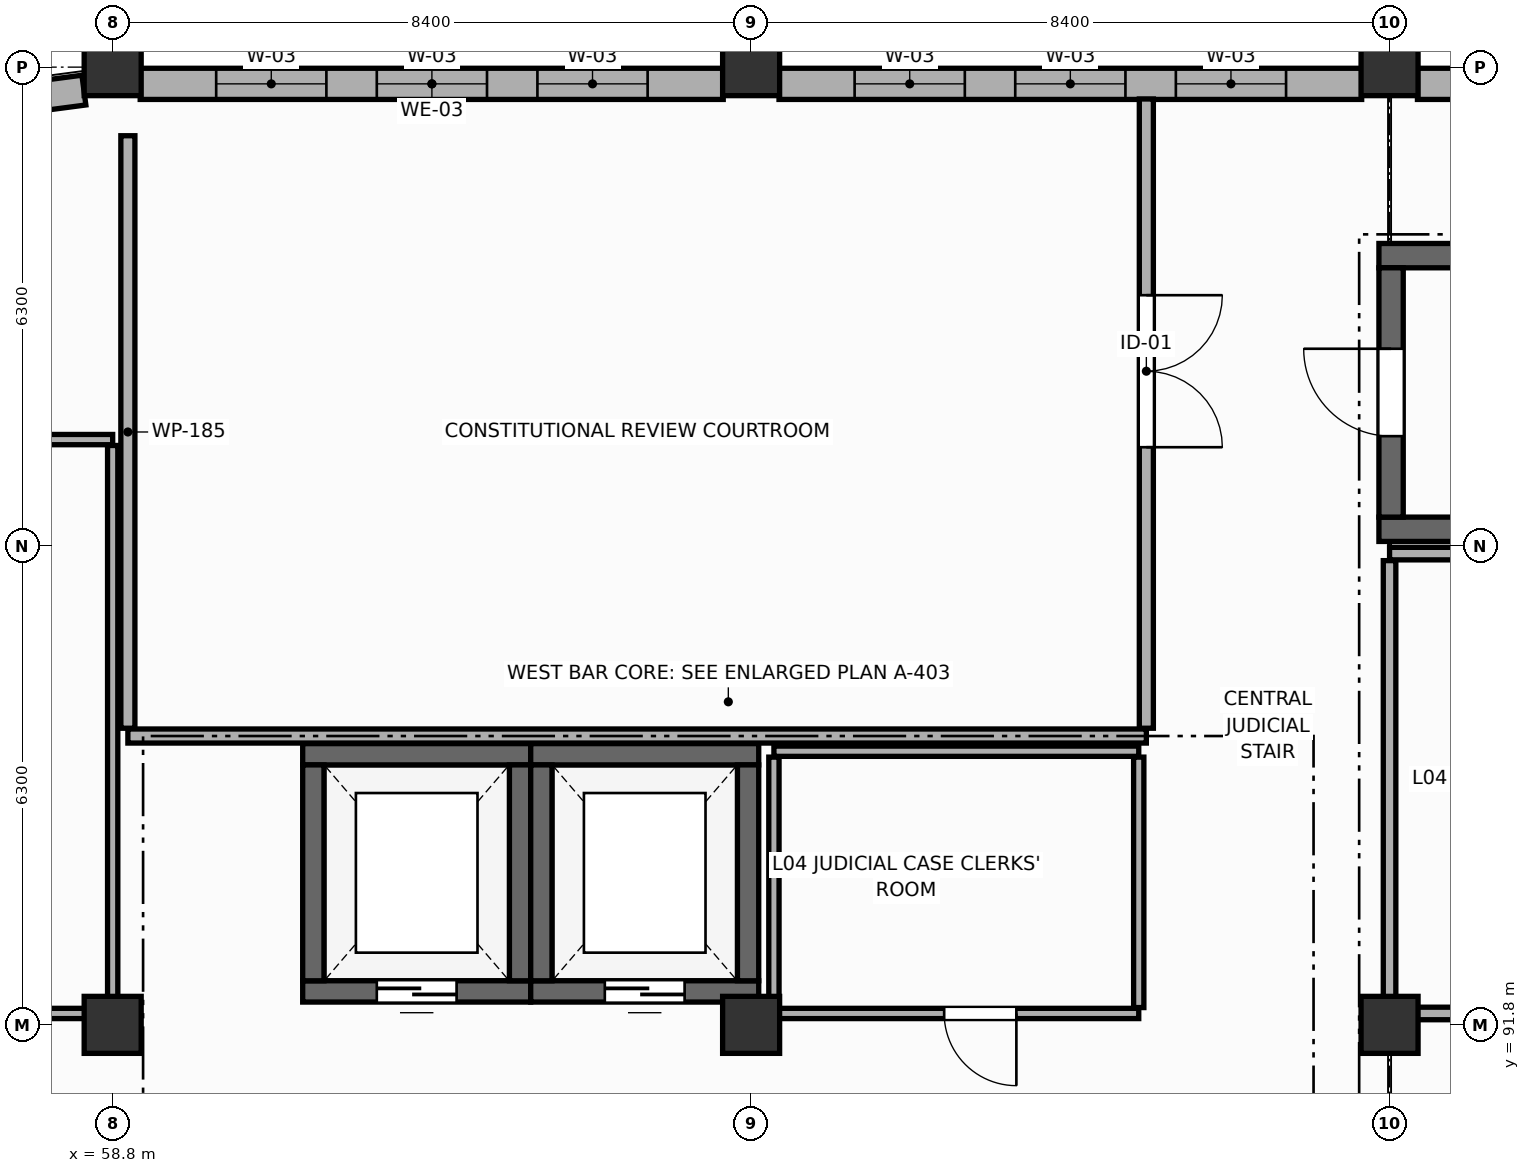
"""IFC4 building model, lengths in metres.
Left out: names, types, materials, properties, quantities, classifications, styles, units other than length and angle.
Written with IfcOpenShell. Run it as: python <this file> out.ifc"""

import sys

from ifc_helpers import new_model, si_unit, direction, frame, frame_2d, origin, origin_2d, place, context, subcontext, project, spatial, rectangle, extrude, element, fill, save


model = new_model("IFC4")
c1 = context("Model", 3, precision=1e-05, world=origin(), true_north=direction((0.0, 1.0)))
c2 = subcontext(c1, "Body", "Model", "MODEL_VIEW")
j1 = project(units=[si_unit("LENGTHUNIT", "METRE"), si_unit("PLANEANGLEUNIT", "RADIAN")], contexts=[c1])
p1 = place(None, origin())
s1 = spatial("IfcSite", under=j1, at=p1, CompositionType="ELEMENT")
p2 = place(p1, origin())
s2 = spatial("IfcBuilding", under=s1, at=p2, CompositionType="ELEMENT")
p3 = place(p2, frame((0.0, 0.0, 14.4)))
s3 = spatial("IfcBuildingStorey", under=s2, at=p3, CompositionType="ELEMENT", Elevation=14.4)
for number, where, z_axis, x_axis in (
    (1, (58.8, 91.8, 0.0), (0.0, 0.0, 1.0), (1.0, 0.0, 0.0)),
    (2, (58.8, 104.4, 0.0), (0.0, 0.0, 1.0), (1.0, 0.0, 0.0)),
    (3, (67.2, 91.8, 0.0), (0.0, 0.0, 1.0), (1.0, 0.0, 0.0)),
    (4, (67.2, 104.4, 0.0), (0.0, 0.0, 1.0), (1.0, 0.0, 0.0)),
    (5, (75.6, 91.8, 0.0), (0.0, 0.0, 1.0), (1.0, 0.0, 0.0)),
    (6, (75.6, 104.4, 0.0), (0.0, 0.0, 1.0), (1.0, 0.0, 0.0)),
):
    element("IfcColumn", number, at=place(p3, frame(where, z_axis=z_axis, x_axis=x_axis)), inside=s3, PredefinedType="COLUMN", context=c2, shape_type="SweptSolid", body=[
        extrude(rectangle(XDim=0.75, YDim=0.75, at=origin_2d()), origin(), (0.0, 0.0, 1.0), 4.2),
    ])
p4 = place(p3, frame((59.162, 104.18, 0.0), z_axis=(0.0, 0.0, 1.0), x_axis=(1.0, 0.0, 0.0)))
e7 = element("IfcWall", 7, at=p4, inside=s3, PredefinedType="STANDARD", context=c2, shape_type="SweptSolid", body=[
    extrude(rectangle(XDim=7.671, YDim=0.41, at=frame_2d((3.835, 0.0))), origin(), (0.0, 0.0, 1.0), 3.09),
])
p5 = place(p4, frame((1.0, 0.0, 0.85)))
e8 = element("IfcOpeningElement", 8, at=p5, cuts=e7, PredefinedType="OPENING", context=c2, shape_type="SweptSolid", body=[
    extrude(rectangle(XDim=1.45, YDim=2.05, at=frame_2d((0.725, 1.025))), frame((0.0, 0.215, 0.0), z_axis=(0.0, -1.0, 0.0), x_axis=(1.0, 0.0, 0.0)), (0.0, 0.0, 1.0), 0.43),
])
p6 = place(p4, frame((3.113, 0.0, 0.85)))
e9 = element("IfcOpeningElement", 9, at=p6, cuts=e7, PredefinedType="OPENING", context=c2, shape_type="SweptSolid", body=[
    extrude(rectangle(XDim=1.45, YDim=2.05, at=frame_2d((0.725, 1.025))), frame((0.0, 0.215, 0.0), z_axis=(0.0, -1.0, 0.0), x_axis=(1.0, 0.0, 0.0)), (0.0, 0.0, 1.0), 0.43),
])
p7 = place(p4, frame((5.226, 0.0, 0.85)))
e10 = element("IfcOpeningElement", 10, at=p7, cuts=e7, PredefinedType="OPENING", context=c2, shape_type="SweptSolid", body=[
    extrude(rectangle(XDim=1.45, YDim=2.05, at=frame_2d((0.725, 1.025))), frame((0.0, 0.215, 0.0), z_axis=(0.0, -1.0, 0.0), x_axis=(1.0, 0.0, 0.0)), (0.0, 0.0, 1.0), 0.43),
])
p8 = place(p3, frame((67.567, 104.18, 0.0), z_axis=(0.0, 0.0, 1.0), x_axis=(1.0, 0.0, 0.0)))
e11 = element("IfcWall", 11, at=p8, inside=s3, PredefinedType="STANDARD", context=c2, shape_type="SweptSolid", body=[
    extrude(rectangle(XDim=7.666, YDim=0.41, at=frame_2d((3.833, 0.0))), origin(), (0.0, 0.0, 1.0), 3.09),
])
p9 = place(p8, frame((0.995, 0.0, 0.85)))
e12 = element("IfcOpeningElement", 12, at=p9, cuts=e11, PredefinedType="OPENING", context=c2, shape_type="SweptSolid", body=[
    extrude(rectangle(XDim=1.45, YDim=2.05, at=frame_2d((0.725, 1.025))), frame((0.0, 0.215, 0.0), z_axis=(0.0, -1.0, 0.0), x_axis=(1.0, 0.0, 0.0)), (0.0, 0.0, 1.0), 0.43),
])
p10 = place(p8, frame((3.108, 0.0, 0.85)))
e13 = element("IfcOpeningElement", 13, at=p10, cuts=e11, PredefinedType="OPENING", context=c2, shape_type="SweptSolid", body=[
    extrude(rectangle(XDim=1.45, YDim=2.05, at=frame_2d((0.725, 1.025))), frame((0.0, 0.215, 0.0), z_axis=(0.0, -1.0, 0.0), x_axis=(1.0, 0.0, 0.0)), (0.0, 0.0, 1.0), 0.43),
])
p11 = place(p8, frame((5.221, 0.0, 0.85)))
e14 = element("IfcOpeningElement", 14, at=p11, cuts=e11, PredefinedType="OPENING", context=c2, shape_type="SweptSolid", body=[
    extrude(rectangle(XDim=1.45, YDim=2.05, at=frame_2d((0.725, 1.025))), frame((0.0, 0.215, 0.0), z_axis=(0.0, -1.0, 0.0), x_axis=(1.0, 0.0, 0.0)), (0.0, 0.0, 1.0), 0.43),
])
p12 = place(p3, frame((75.967, 104.18, 0.0), z_axis=(0.0, 0.0, 1.0), x_axis=(1.0, 0.0, 0.0)))
e15 = element("IfcWall", 15, at=p12, inside=s3, PredefinedType="STANDARD", context=c2, shape_type="SweptSolid", body=[
    extrude(rectangle(XDim=7.666, YDim=0.41, at=frame_2d((3.833, 0.0))), origin(), (0.0, 0.0, 1.0), 3.09),
])
p13 = place(p3, frame((58.421, 104.098, 0.0), z_axis=(0.0, 0.0, 1.0), x_axis=(-0.991451982445, -0.130472090904, 0.0)))
e16 = element("IfcWall", 16, at=p13, inside=s3, PredefinedType="ELEMENTEDWALL", context=c2, shape_type="SweptSolid", body=[
    extrude(rectangle(XDim=2.874, YDim=0.395, at=frame_2d((1.437, 0.0))), origin(), (0.0, 0.0, 1.0), 3.09),
])
p14 = place(p13, frame((1.037, 0.0, 0.85)))
e17 = element("IfcOpeningElement", 17, at=p14, cuts=e16, PredefinedType="OPENING", context=c2, shape_type="SweptSolid", body=[
    extrude(rectangle(XDim=0.8, YDim=1.7, at=frame_2d((0.4, 0.85))), frame((0.0, 0.208, 0.0), z_axis=(0.0, -1.0, 0.0), x_axis=(1.0, 0.0, 0.0)), (0.0, 0.0, 1.0), 0.415),
])
p15 = place(p3, frame((101.8, 104.6, 0.235), z_axis=(0.0, 0.0, 1.0), x_axis=(-1.0, 0.0, 0.0)))
e18 = element("IfcWall", 18, at=p15, inside=s3, PredefinedType="PARAPET", context=c2, shape_type="SweptSolid", body=[
    extrude(rectangle(XDim=55.4, YDim=0.265, at=frame_2d((27.7, 0.0))), origin(), (0.0, 0.0, 1.0), 1.145),
])
for number, where, z_axis, x_axis in (
    (19, (75.46, 101.92, 0.0), (0.0, 0.0, 1.0), (1.0, 0.0, 0.0)),
    (20, (84.54, 98.32, 0.0), (0.0, 0.0, 1.0), (-1.0, 0.0, 0.0)),
):
    element("IfcWall", number, at=place(p3, frame(where, z_axis=z_axis, x_axis=x_axis)), inside=s3, PredefinedType="SHEAR", context=c2, shape_type="SweptSolid", body=[
        extrude(rectangle(XDim=9.08, YDim=0.32, at=frame_2d((4.54, 0.0))), origin(), (0.0, 0.0, 1.0), 3.96),
    ])
p16 = place(p3, frame((75.62, 98.48, 0.0), z_axis=(0.0, 0.0, 1.0), x_axis=(0.0, 1.0, 0.0)))
e21 = element("IfcWall", 21, at=p16, inside=s3, PredefinedType="SHEAR", context=c2, shape_type="SweptSolid", body=[
    extrude(rectangle(XDim=3.28, YDim=0.32, at=frame_2d((1.64, 0.0))), origin(), (0.0, 0.0, 1.0), 3.96),
])
p17 = place(p16, frame((1.065, 0.0, 0.0)))
e22 = element("IfcOpeningElement", 22, at=p17, cuts=e21, PredefinedType="OPENING", context=c2, shape_type="SweptSolid", body=[
    extrude(rectangle(XDim=1.15, YDim=2.2, at=frame_2d((0.575, 1.1))), frame((0.0, 0.17, 0.0), z_axis=(0.0, -1.0, 0.0), x_axis=(1.0, 0.0, 0.0)), (0.0, 0.0, 1.0), 0.34),
])
p18 = place(p3, frame((61.3, 95.36, 0.0), z_axis=(0.0, 0.0, 1.0), x_axis=(1.0, 0.0, 0.0)))
e23 = element("IfcWall", 23, at=p18, inside=s3, PredefinedType="SHEAR", context=c2, shape_type="SweptSolid", body=[
    extrude(rectangle(XDim=3.0, YDim=0.28, at=frame_2d((1.5, 0.0))), origin(), (0.0, 0.0, 1.0), 3.96),
])
p19 = place(p3, frame((64.3, 92.24, 0.0), z_axis=(0.0, 0.0, 1.0), x_axis=(-1.0, 0.0, 0.0)))
e24 = element("IfcWall", 24, at=p19, inside=s3, PredefinedType="SHEAR", context=c2, shape_type="SweptSolid", body=[
    extrude(rectangle(XDim=3.0, YDim=0.28, at=frame_2d((1.5, 0.0))), origin(), (0.0, 0.0, 1.0), 3.96),
])
p20 = place(p19, frame((0.975, 0.0, 0.0)))
e25 = element("IfcOpeningElement", 25, at=p20, cuts=e24, PredefinedType="OPENING", context=c2, shape_type="SweptSolid", body=[
    extrude(rectangle(XDim=1.05, YDim=2.2, at=frame_2d((0.525, 1.1))), frame((0.0, 0.15, 0.0), z_axis=(0.0, -1.0, 0.0), x_axis=(1.0, 0.0, 0.0)), (0.0, 0.0, 1.0), 0.3),
])
for number, where, z_axis, x_axis in (
    (26, (61.44, 92.38, 0.0), (0.0, 0.0, 1.0), (0.0, 1.0, 0.0)),
    (27, (64.16, 95.22, 0.0), (0.0, 0.0, 1.0), (0.0, -1.0, 0.0)),
):
    element("IfcWall", number, at=place(p3, frame(where, z_axis=z_axis, x_axis=x_axis)), inside=s3, PredefinedType="SHEAR", context=c2, shape_type="SweptSolid", body=[
        extrude(rectangle(XDim=2.84, YDim=0.28, at=frame_2d((1.42, 0.0))), origin(), (0.0, 0.0, 1.0), 3.96),
    ])
p21 = place(p3, frame((64.3, 95.36, 0.0), z_axis=(0.0, 0.0, 1.0), x_axis=(1.0, 0.0, 0.0)))
e28 = element("IfcWall", 28, at=p21, inside=s3, PredefinedType="SHEAR", context=c2, shape_type="SweptSolid", body=[
    extrude(rectangle(XDim=3.0, YDim=0.28, at=frame_2d((1.5, 0.0))), origin(), (0.0, 0.0, 1.0), 3.96),
])
p22 = place(p3, frame((67.3, 92.24, 0.0), z_axis=(0.0, 0.0, 1.0), x_axis=(-1.0, 0.0, 0.0)))
e29 = element("IfcWall", 29, at=p22, inside=s3, PredefinedType="SHEAR", context=c2, shape_type="SweptSolid", body=[
    extrude(rectangle(XDim=3.0, YDim=0.28, at=frame_2d((1.5, 0.0))), origin(), (0.0, 0.0, 1.0), 3.96),
])
p23 = place(p22, frame((0.975, 0.0, 0.0)))
e30 = element("IfcOpeningElement", 30, at=p23, cuts=e29, PredefinedType="OPENING", context=c2, shape_type="SweptSolid", body=[
    extrude(rectangle(XDim=1.05, YDim=2.2, at=frame_2d((0.525, 1.1))), frame((0.0, 0.15, 0.0), z_axis=(0.0, -1.0, 0.0), x_axis=(1.0, 0.0, 0.0)), (0.0, 0.0, 1.0), 0.3),
])
for number, where, z_axis, x_axis in (
    (31, (64.44, 92.38, 0.0), (0.0, 0.0, 1.0), (0.0, 1.0, 0.0)),
    (32, (67.16, 95.22, 0.0), (0.0, 0.0, 1.0), (0.0, -1.0, 0.0)),
):
    element("IfcWall", number, at=place(p3, frame(where, z_axis=z_axis, x_axis=x_axis)), inside=s3, PredefinedType="SHEAR", context=c2, shape_type="SweptSolid", body=[
        extrude(rectangle(XDim=2.84, YDim=0.28, at=frame_2d((1.42, 0.0))), origin(), (0.0, 0.0, 1.0), 3.96),
    ])
p24 = place(p3, frame((72.4, 95.6, 0.0), z_axis=(0.0, 0.0, 1.0), x_axis=(-1.0, 0.0, 0.0)))
e33 = element("IfcWall", 33, at=p24, inside=s3, PredefinedType="PARTITIONING", context=c2, shape_type="SweptSolid", body=[
    extrude(rectangle(XDim=13.4, YDim=0.185, at=frame_2d((6.7, 0.0))), origin(), (0.0, 0.0, 1.0), 3.09),
])
p25 = place(p3, frame((59.0, 95.702, 0.0), z_axis=(0.0, 0.0, 1.0), x_axis=(0.0, 1.0, 0.0)))
e34 = element("IfcWall", 34, at=p25, inside=s3, PredefinedType="PARTITIONING", context=c2, shape_type="SweptSolid", body=[
    extrude(rectangle(XDim=7.795, YDim=0.185, at=frame_2d((3.897, 0.0))), origin(), (0.0, 0.0, 1.0), 3.09),
])
p26 = place(p3, frame((72.4, 103.981, 0.0), z_axis=(0.0, 0.0, 1.0), x_axis=(0.0, -1.0, 0.0)))
e35 = element("IfcWall", 35, at=p26, inside=s3, PredefinedType="PARTITIONING", context=c2, shape_type="SweptSolid", body=[
    extrude(rectangle(XDim=8.279, YDim=0.185, at=frame_2d((4.139, 0.0))), origin(), (0.0, 0.0, 1.0), 3.34),
])
p27 = place(p26, frame((2.581, 0.0, 0.0)))
e36 = element("IfcOpeningElement", 36, at=p27, cuts=e35, PredefinedType="OPENING", context=c2, shape_type="SweptSolid", body=[
    extrude(rectangle(XDim=2.0, YDim=2.5, at=frame_2d((1.0, 1.25))), frame((0.0, 0.103, 0.0), z_axis=(0.0, -1.0, 0.0), x_axis=(1.0, 0.0, 0.0)), (0.0, 0.0, 1.0), 0.205),
])
p28 = place(p3, frame((67.5, 95.4, 0.0), z_axis=(0.0, 0.0, 1.0), x_axis=(1.0, 0.0, 0.0)))
e37 = element("IfcWall", 37, at=p28, inside=s3, PredefinedType="PARTITIONING", context=c2, shape_type="SweptSolid", body=[
    extrude(rectangle(XDim=4.8, YDim=0.135, at=frame_2d((2.4, 0.0))), origin(), (0.0, 0.0, 1.0), 3.09),
])
p29 = place(p3, frame((72.3, 91.95, 0.0), z_axis=(0.0, 0.0, 1.0), x_axis=(-1.0, 0.0, 0.0)))
e38 = element("IfcWall", 38, at=p29, inside=s3, PredefinedType="PARTITIONING", context=c2, shape_type="SweptSolid", body=[
    extrude(rectangle(XDim=4.8, YDim=0.135, at=frame_2d((2.4, 0.0))), origin(), (0.0, 0.0, 1.0), 3.09),
])
p30 = place(p29, frame((1.61, 0.0, 0.0)))
e39 = element("IfcOpeningElement", 39, at=p30, cuts=e38, PredefinedType="OPENING", context=c2, shape_type="SweptSolid", body=[
    extrude(rectangle(XDim=0.95, YDim=2.15, at=frame_2d((0.475, 1.075))), frame((0.0, 0.077, 0.0), z_axis=(0.0, -1.0, 0.0), x_axis=(1.0, 0.0, 0.0)), (0.0, 0.0, 1.0), 0.155),
])
p31 = place(p3, frame((67.5, 92.028, 0.0), z_axis=(0.0, 0.0, 1.0), x_axis=(0.0, 1.0, 0.0)))
e40 = element("IfcWall", 40, at=p31, inside=s3, PredefinedType="PARTITIONING", context=c2, shape_type="SweptSolid", body=[
    extrude(rectangle(XDim=3.295, YDim=0.135, at=frame_2d((1.647, 0.0))), origin(), (0.0, 0.0, 1.0), 3.09),
])
p32 = place(p3, frame((72.3, 95.323, 0.0), z_axis=(0.0, 0.0, 1.0), x_axis=(0.0, -1.0, 0.0)))
e41 = element("IfcWall", 41, at=p32, inside=s3, PredefinedType="PARTITIONING", context=c2, shape_type="SweptSolid", body=[
    extrude(rectangle(XDim=3.295, YDim=0.135, at=frame_2d((1.647, 0.0))), origin(), (0.0, 0.0, 1.0), 3.39),
])
p33 = place(p3, frame((75.6, 98.0, 0.0), z_axis=(0.0, 0.0, 1.0), x_axis=(1.0, 0.0, 0.0)))
e42 = element("IfcWall", 42, at=p33, inside=s3, PredefinedType="PARTITIONING", context=c2, shape_type="SweptSolid", body=[
    extrude(rectangle(XDim=8.8, YDim=0.165, at=frame_2d((4.4, 0.0))), origin(), (0.0, 0.0, 1.0), 3.09),
])
p34 = place(p3, frame((84.4, 91.95, 0.0), z_axis=(0.0, 0.0, 1.0), x_axis=(-1.0, 0.0, 0.0)))
e43 = element("IfcWall", 43, at=p34, inside=s3, PredefinedType="PARTITIONING", context=c2, shape_type="SweptSolid", body=[
    extrude(rectangle(XDim=8.8, YDim=0.165, at=frame_2d((4.4, 0.0))), origin(), (0.0, 0.0, 1.0), 3.09),
])
p35 = place(p34, frame((3.545, 0.0, 0.0)))
e44 = element("IfcOpeningElement", 44, at=p35, cuts=e43, PredefinedType="OPENING", context=c2, shape_type="SweptSolid", body=[
    extrude(rectangle(XDim=1.0, YDim=2.15, at=frame_2d((0.5, 1.075))), frame((0.0, 0.093, 0.0), z_axis=(0.0, -1.0, 0.0), x_axis=(1.0, 0.0, 0.0)), (0.0, 0.0, 1.0), 0.185),
])
p36 = place(p3, frame((75.6, 92.042, 0.0), z_axis=(0.0, 0.0, 1.0), x_axis=(0.0, 1.0, 0.0)))
e45 = element("IfcWall", 45, at=p36, inside=s3, PredefinedType="PARTITIONING", context=c2, shape_type="SweptSolid", body=[
    extrude(rectangle(XDim=5.865, YDim=0.165, at=frame_2d((2.933, 0.0))), origin(), (0.0, 0.0, 1.0), 3.09),
])
p37 = place(p3, frame((49.3, 99.5, 0.0), z_axis=(0.0, 0.0, 1.0), x_axis=(1.0, 0.0, 0.0)))
e46 = element("IfcWall", 46, at=p37, inside=s3, PredefinedType="PARTITIONING", context=c2, shape_type="SweptSolid", body=[
    extrude(rectangle(XDim=9.5, YDim=0.135, at=frame_2d((4.75, 0.0))), origin(), (0.0, 0.0, 1.0), 2.99),
])
p38 = place(p3, frame((58.8, 91.95, 0.0), z_axis=(0.0, 0.0, 1.0), x_axis=(-1.0, 0.0, 0.0)))
e47 = element("IfcWall", 47, at=p38, inside=s3, PredefinedType="PARTITIONING", context=c2, shape_type="SweptSolid", body=[
    extrude(rectangle(XDim=9.5, YDim=0.135, at=frame_2d((4.75, 0.0))), origin(), (0.0, 0.0, 1.0), 2.99),
])
p39 = place(p38, frame((3.073, 0.0, 0.0)))
e48 = element("IfcOpeningElement", 48, at=p39, cuts=e47, PredefinedType="OPENING", context=c2, shape_type="SweptSolid", body=[
    extrude(rectangle(XDim=1.02, YDim=2.15, at=frame_2d((0.51, 1.075))), frame((0.0, 0.077, 0.0), z_axis=(0.0, -1.0, 0.0), x_axis=(1.0, 0.0, 0.0)), (0.0, 0.0, 1.0), 0.155),
])
p40 = place(p3, frame((58.8, 99.423, 0.0), z_axis=(0.0, 0.0, 1.0), x_axis=(0.0, -1.0, 0.0)))
e49 = element("IfcWall", 49, at=p40, inside=s3, PredefinedType="PARTITIONING", context=c2, shape_type="SweptSolid", body=[
    extrude(rectangle(XDim=7.395, YDim=0.135, at=frame_2d((3.698, 0.0))), origin(), (0.0, 0.0, 1.0), 3.09),
])
p41 = place(p5, origin())
e50 = element("IfcWindow", 50, at=p41, inside=s3, PartitioningType="SINGLE_PANEL", PredefinedType="WINDOW", context=c2, shape_type="SweptSolid", body=[
    extrude(rectangle(XDim=1.45, YDim=2.05, at=frame_2d((0.725, 1.025))), frame((0.0, 0.03, 0.0), z_axis=(0.0, -1.0, 0.0), x_axis=(1.0, 0.0, 0.0)), (0.0, 0.0, 1.0), 0.06),
])
fill(e8, e50)
p42 = place(p6, origin())
e51 = element("IfcWindow", 51, at=p42, inside=s3, PartitioningType="SINGLE_PANEL", PredefinedType="WINDOW", context=c2, shape_type="SweptSolid", body=[
    extrude(rectangle(XDim=1.45, YDim=2.05, at=frame_2d((0.725, 1.025))), frame((0.0, 0.03, 0.0), z_axis=(0.0, -1.0, 0.0), x_axis=(1.0, 0.0, 0.0)), (0.0, 0.0, 1.0), 0.06),
])
fill(e9, e51)
p43 = place(p7, origin())
e52 = element("IfcWindow", 52, at=p43, inside=s3, PartitioningType="SINGLE_PANEL", PredefinedType="WINDOW", context=c2, shape_type="SweptSolid", body=[
    extrude(rectangle(XDim=1.45, YDim=2.05, at=frame_2d((0.725, 1.025))), frame((0.0, 0.03, 0.0), z_axis=(0.0, -1.0, 0.0), x_axis=(1.0, 0.0, 0.0)), (0.0, 0.0, 1.0), 0.06),
])
fill(e10, e52)
p44 = place(p9, origin())
e53 = element("IfcWindow", 53, at=p44, inside=s3, PartitioningType="SINGLE_PANEL", PredefinedType="WINDOW", context=c2, shape_type="SweptSolid", body=[
    extrude(rectangle(XDim=1.45, YDim=2.05, at=frame_2d((0.725, 1.025))), frame((0.0, 0.03, 0.0), z_axis=(0.0, -1.0, 0.0), x_axis=(1.0, 0.0, 0.0)), (0.0, 0.0, 1.0), 0.06),
])
fill(e12, e53)
p45 = place(p10, origin())
e54 = element("IfcWindow", 54, at=p45, inside=s3, PartitioningType="SINGLE_PANEL", PredefinedType="WINDOW", context=c2, shape_type="SweptSolid", body=[
    extrude(rectangle(XDim=1.45, YDim=2.05, at=frame_2d((0.725, 1.025))), frame((0.0, 0.03, 0.0), z_axis=(0.0, -1.0, 0.0), x_axis=(1.0, 0.0, 0.0)), (0.0, 0.0, 1.0), 0.06),
])
fill(e13, e54)
p46 = place(p11, origin())
e55 = element("IfcWindow", 55, at=p46, inside=s3, PartitioningType="SINGLE_PANEL", PredefinedType="WINDOW", context=c2, shape_type="SweptSolid", body=[
    extrude(rectangle(XDim=1.45, YDim=2.05, at=frame_2d((0.725, 1.025))), frame((0.0, 0.03, 0.0), z_axis=(0.0, -1.0, 0.0), x_axis=(1.0, 0.0, 0.0)), (0.0, 0.0, 1.0), 0.06),
])
fill(e14, e55)
p47 = place(p17, origin())
e56 = element("IfcDoor", 56, at=p47, inside=s3, OperationType="SINGLE_SWING_RIGHT", PredefinedType="DOOR", context=c2, shape_type="SweptSolid", body=[
    extrude(rectangle(XDim=1.15, YDim=2.2, at=frame_2d((0.575, 1.1))), frame((0.0, 0.025, 0.0), z_axis=(0.0, -1.0, 0.0), x_axis=(1.0, 0.0, 0.0)), (0.0, 0.0, 1.0), 0.05),
])
fill(e22, e56)
p48 = place(p20, origin())
e57 = element("IfcDoor", 57, at=p48, inside=s3, OperationType="DOUBLE_DOOR_SLIDING", PredefinedType="DOOR", context=c2, shape_type="SweptSolid", body=[
    extrude(rectangle(XDim=1.05, YDim=2.2, at=frame_2d((0.525, 1.1))), frame((0.0, 0.025, 0.0), z_axis=(0.0, -1.0, 0.0), x_axis=(1.0, 0.0, 0.0)), (0.0, 0.0, 1.0), 0.05),
])
fill(e25, e57)
p49 = place(p23, origin())
e58 = element("IfcDoor", 58, at=p49, inside=s3, OperationType="DOUBLE_DOOR_SLIDING", PredefinedType="DOOR", context=c2, shape_type="SweptSolid", body=[
    extrude(rectangle(XDim=1.05, YDim=2.2, at=frame_2d((0.525, 1.1))), frame((0.0, 0.025, 0.0), z_axis=(0.0, -1.0, 0.0), x_axis=(1.0, 0.0, 0.0)), (0.0, 0.0, 1.0), 0.05),
])
fill(e30, e58)
p50 = place(p27, origin())
e59 = element("IfcDoor", 59, at=p50, inside=s3, OperationType="DOUBLE_DOOR_SINGLE_SWING", PredefinedType="DOOR", context=c2, shape_type="SweptSolid", body=[
    extrude(rectangle(XDim=2.0, YDim=2.5, at=frame_2d((1.0, 1.25))), frame((0.0, 0.025, 0.0), z_axis=(0.0, -1.0, 0.0), x_axis=(1.0, 0.0, 0.0)), (0.0, 0.0, 1.0), 0.05),
])
fill(e36, e59)
p51 = place(p30, origin())
e60 = element("IfcDoor", 60, at=p51, inside=s3, OperationType="SINGLE_SWING_LEFT", PredefinedType="DOOR", context=c2, shape_type="SweptSolid", body=[
    extrude(rectangle(XDim=0.95, YDim=2.15, at=frame_2d((0.475, 1.075))), frame((0.0, 0.025, 0.0), z_axis=(0.0, -1.0, 0.0), x_axis=(1.0, 0.0, 0.0)), (0.0, 0.0, 1.0), 0.05),
])
fill(e39, e60)
save(model, sys.argv[1])
